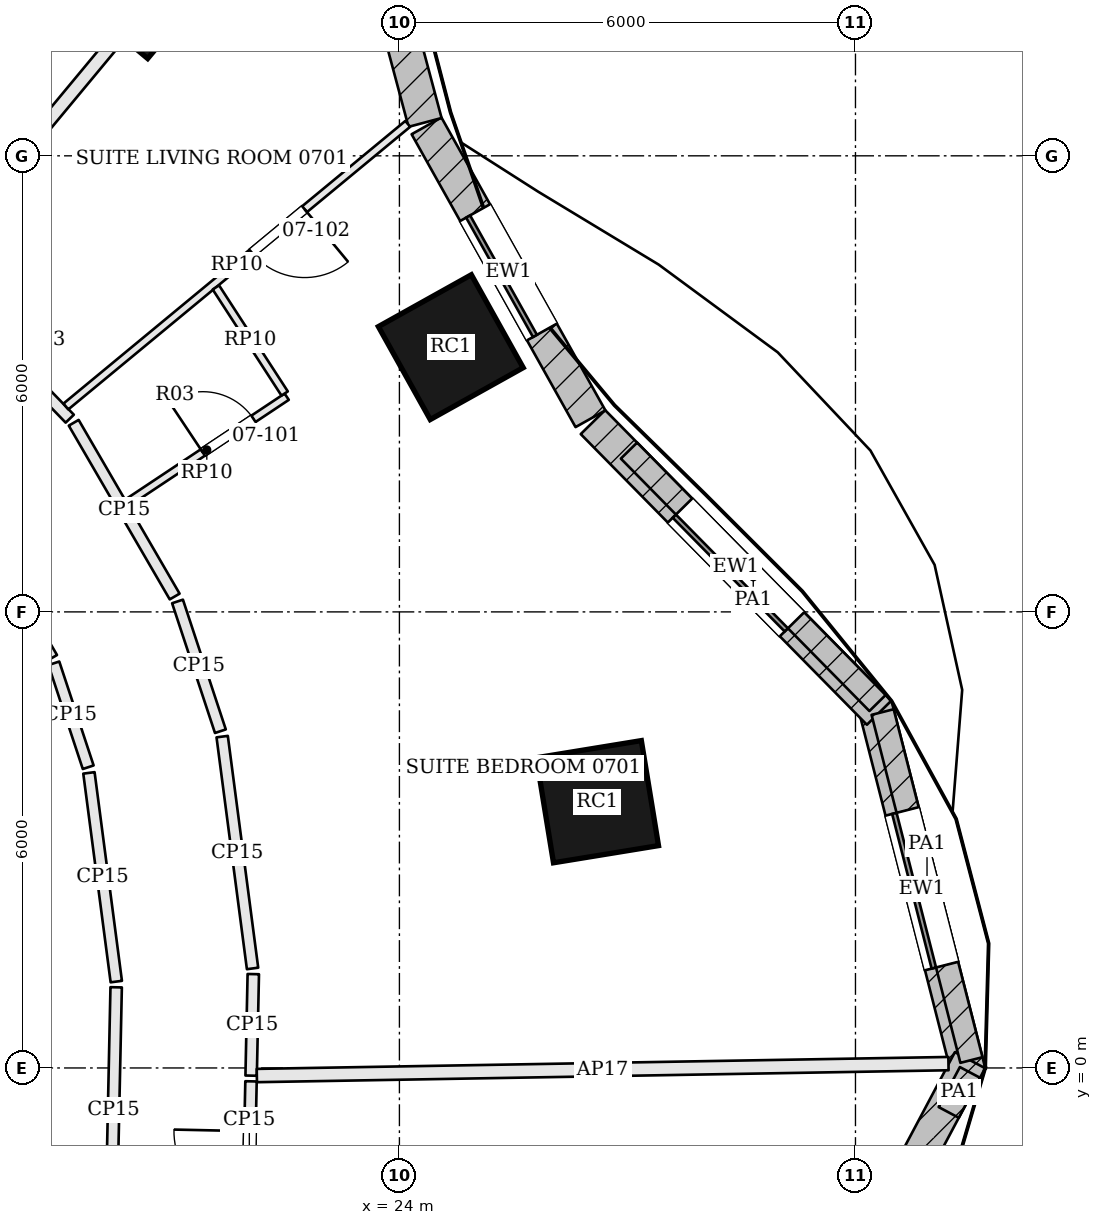
"""IFC4 building model, lengths in metres.
Left out: names, types, materials, properties, quantities, classifications, styles, units other than length and angle.
Written with IfcOpenShell. Run it as: python <this file> out.ifc"""

import sys

from ifc_helpers import new_model, si_unit, direction, frame, frame_2d, origin, origin_2d, place, context, subcontext, project, spatial, rectangle, extrude, element, fill, save


model = new_model("IFC4")
c1 = context("Model", 3, precision=1e-05, world=origin(), true_north=direction((0.0, 1.0)))
c2 = subcontext(c1, "Body", "Model", "MODEL_VIEW")
j1 = project(units=[si_unit("LENGTHUNIT", "METRE"), si_unit("PLANEANGLEUNIT", "RADIAN")], contexts=[c1])
p1 = place(None, origin())
s1 = spatial("IfcSite", under=j1, at=p1, CompositionType="ELEMENT")
p2 = place(p1, origin())
s2 = spatial("IfcBuilding", under=s1, at=p2, CompositionType="ELEMENT")
p3 = place(p2, frame((0.0, 0.0, 41.1)))
s3 = spatial("IfcBuildingStorey", under=s2, at=p3, CompositionType="ELEMENT", Elevation=41.1)
for number, where, z_axis, x_axis in (
    (1, (26.605, 3.503, 0.0), (0.0, 0.0, 1.0), (-0.161, 0.987, 0.0)),
    (2, (24.676, 9.483, 0.0), (0.0, 0.0, 1.0), (-0.487, 0.873, 0.0)),
    (3, (20.6, 14.266, 0.0), (0.0, 0.0, 1.0), (-0.767, 0.641, 0.0)),
):
    element("IfcColumn", number, at=place(p3, frame(where, z_axis=z_axis, x_axis=x_axis)), inside=s3, PredefinedType="COLUMN", context=c2, shape_type="SweptSolid", body=[
        extrude(rectangle(XDim=1.4, YDim=1.4, at=origin_2d()), origin(), (0.0, 0.0, 1.0), 3.6),
    ])
p4 = place(p3, frame((31.489, -0.056, 0.0), z_axis=(0.0, 0.0, 1.0), x_axis=(-0.247283399528, 0.968943197674, 0.0)))
e4 = element("IfcWall", 4, at=p4, inside=s3, PredefinedType="SOLIDWALL", context=c2, shape_type="SweptSolid", body=[
    extrude(rectangle(XDim=4.982, YDim=0.45, at=frame_2d((2.491, 0.0))), origin(), (0.0, 0.0, 1.0), 3.4),
])
p5 = place(p4, frame((1.441, 0.0, 0.9)))
e5 = element("IfcOpeningElement", 5, at=p5, cuts=e4, PredefinedType="OPENING", context=c2, shape_type="SweptSolid", body=[
    extrude(rectangle(XDim=2.1, YDim=2.0, at=frame_2d((1.05, 1.0))), frame((0.0, 0.235, 0.0), z_axis=(0.0, -1.0, 0.0), x_axis=(1.0, 0.0, 0.0)), (0.0, 0.0, 1.0), 0.47),
])
p6 = place(p3, frame((30.311, 4.673, 0.0), z_axis=(0.0, 0.0, 1.0), x_axis=(-0.701580441607, 0.712590263724, 0.0)))
e6 = element("IfcWall", 6, at=p6, inside=s3, PredefinedType="SOLIDWALL", context=c2, shape_type="SweptSolid", body=[
    extrude(rectangle(XDim=5.366, YDim=0.45, at=frame_2d((2.683, 0.0))), origin(), (0.0, 0.0, 1.0), 3.4),
])
p7 = place(p6, frame((1.633, 0.0, 0.9)))
e7 = element("IfcOpeningElement", 7, at=p7, cuts=e6, PredefinedType="OPENING", context=c2, shape_type="SweptSolid", body=[
    extrude(rectangle(XDim=2.1, YDim=2.0, at=frame_2d((1.05, 1.0))), frame((0.0, 0.235, 0.0), z_axis=(0.0, -1.0, 0.0), x_axis=(1.0, 0.0, 0.0)), (0.0, 0.0, 1.0), 0.47),
])
p8 = place(p3, frame((26.514, 8.541, 0.0), z_axis=(0.0, 0.0, 1.0), x_axis=(-0.488504028898, 0.87256163894, 0.0)))
e8 = element("IfcWall", 8, at=p8, inside=s3, PredefinedType="SOLIDWALL", context=c2, shape_type="SweptSolid", body=[
    extrude(rectangle(XDim=4.416, YDim=0.45, at=frame_2d((2.208, 0.0))), origin(), (0.0, 0.0, 1.0), 3.4),
])
p9 = place(p8, frame((1.308, 0.0, 0.9)))
e9 = element("IfcOpeningElement", 9, at=p9, cuts=e8, PredefinedType="OPENING", context=c2, shape_type="SweptSolid", body=[
    extrude(rectangle(XDim=1.8, YDim=2.0, at=frame_2d((0.9, 1.0))), frame((0.0, 0.235, 0.0), z_axis=(0.0, -1.0, 0.0), x_axis=(1.0, 0.0, 0.0)), (0.0, 0.0, 1.0), 0.47),
])
p10 = place(p3, frame((24.337, 12.439, 0.0), z_axis=(0.0, 0.0, 1.0), x_axis=(-0.258441377569, 0.966026942875, 0.0)))
e10 = element("IfcWall", 10, at=p10, inside=s3, PredefinedType="SOLIDWALL", context=c2, shape_type="SweptSolid", body=[
    extrude(rectangle(XDim=4.624, YDim=0.45, at=frame_2d((2.312, 0.0))), origin(), (0.0, 0.0, 1.0), 3.4),
])
p11 = place(p10, frame((1.262, 0.0, 0.9)))
e11 = element("IfcOpeningElement", 11, at=p11, cuts=e10, PredefinedType="OPENING", context=c2, shape_type="SweptSolid", body=[
    extrude(rectangle(XDim=2.1, YDim=2.0, at=frame_2d((1.05, 1.0))), frame((0.0, 0.235, 0.0), z_axis=(0.0, -1.0, 0.0), x_axis=(1.0, 0.0, 0.0)), (0.0, 0.0, 1.0), 0.47),
])
p12 = place(p3, frame((29.065, -4.495, 0.0), z_axis=(0.0, 0.0, 1.0), x_axis=(0.469010051546, 0.883192828067, 0.0)))
e12 = element("IfcWall", 12, at=p12, inside=s3, PredefinedType="SOLIDWALL", context=c2, shape_type="SweptSolid", body=[
    extrude(rectangle(XDim=5.206, YDim=0.45, at=frame_2d((2.603, 0.0))), origin(), (0.0, 0.0, 1.0), 3.4),
])
p13 = place(p12, frame((1.553, 0.0, 0.9)))
e13 = element("IfcOpeningElement", 13, at=p13, cuts=e12, PredefinedType="OPENING", context=c2, shape_type="SweptSolid", body=[
    extrude(rectangle(XDim=2.1, YDim=2.0, at=frame_2d((1.05, 1.0))), frame((0.0, 0.235, 0.0), z_axis=(0.0, -1.0, 0.0), x_axis=(1.0, 0.0, 0.0)), (0.0, 0.0, 1.0), 0.47),
])
p14 = place(p3, frame((31.526, 0.104, 3.6), z_axis=(0.0, 0.0, 1.0), x_axis=(-0.247310993439, 0.96893615503, 0.0)))
e14 = element("IfcWall", 14, at=p14, inside=s3, PredefinedType="PARAPET", context=c2, shape_type="SweptSolid", body=[
    extrude(rectangle(XDim=4.725, YDim=0.3, at=frame_2d((2.362, 0.0))), origin(), (0.0, 0.0, 1.0), 1.1),
])
p15 = place(p3, frame((30.29, 4.801, 3.6), z_axis=(0.0, 0.0, 1.0), x_axis=(-0.701637806996, 0.712533780107, 0.0)))
e15 = element("IfcWall", 15, at=p15, inside=s3, PredefinedType="PARAPET", context=c2, shape_type="SweptSolid", body=[
    extrude(rectangle(XDim=4.661, YDim=0.3, at=frame_2d((2.33, 0.0))), origin(), (0.0, 0.0, 1.0), 1.1),
])
p16 = place(p3, frame((31.227, -0.585, 3.6), z_axis=(0.0, 0.0, 1.0), x_axis=(0.469205161074, 0.883089189619, 0.0)))
e16 = element("IfcWall", 16, at=p16, inside=s3, PredefinedType="PARAPET", context=c2, shape_type="SweptSolid", body=[
    extrude(rectangle(XDim=0.596, YDim=0.3, at=frame_2d((0.298, 0.0))), origin(), (0.0, 0.0, 1.0), 1.1),
])
p17 = place(p3, frame((22.049, -0.101, 0.0), z_axis=(0.0, 0.0, 1.0), x_axis=(0.021197940891, 0.999775298406, 0.0)))
e17 = element("IfcWall", 17, at=p17, inside=s3, PredefinedType="PARTITIONING", context=c2, shape_type="SweptSolid", body=[
    extrude(rectangle(XDim=1.336, YDim=0.15, at=frame_2d((0.668, 0.0))), origin(), (0.0, 0.0, 1.0), 2.68),
])
p18 = place(p3, frame((22.068, 1.309, 0.0), z_axis=(0.0, 0.0, 1.0), x_axis=(-0.129922755307, 0.991524118543, 0.0)))
e18 = element("IfcWall", 18, at=p18, inside=s3, PredefinedType="PARTITIONING", context=c2, shape_type="SweptSolid", body=[
    extrude(rectangle(XDim=3.076, YDim=0.15, at=frame_2d((1.538, 0.0))), origin(), (0.0, 0.0, 1.0), 2.68),
])
p19 = place(p3, frame((21.645, 4.43, 0.0), z_axis=(0.0, 0.0, 1.0), x_axis=(-0.313700743044, 0.949521902756, 0.0)))
e19 = element("IfcWall", 19, at=p19, inside=s3, PredefinedType="PARTITIONING", context=c2, shape_type="SweptSolid", body=[
    extrude(rectangle(XDim=1.798, YDim=0.15, at=frame_2d((0.899, 0.0))), origin(), (0.0, 0.0, 1.0), 2.68),
])
p20 = place(p3, frame((21.043, 6.202, 0.0), z_axis=(0.0, 0.0, 1.0), x_axis=(-0.502371650135, 0.864651794158, 0.0)))
e20 = element("IfcWall", 20, at=p20, inside=s3, PredefinedType="PARTITIONING", context=c2, shape_type="SweptSolid", body=[
    extrude(rectangle(XDim=2.644, YDim=0.15, at=frame_2d((1.322, 0.0))), origin(), (0.0, 0.0, 1.0), 2.68),
])
p21 = place(p3, frame((19.663, 8.542, 0.0), z_axis=(0.0, 0.0, 1.0), x_axis=(-0.695220577526, 0.718796458383, 0.0)))
e21 = element("IfcWall", 21, at=p21, inside=s3, PredefinedType="PARTITIONING", context=c2, shape_type="SweptSolid", body=[
    extrude(rectangle(XDim=2.734, YDim=0.15, at=frame_2d((1.367, 0.0))), origin(), (0.0, 0.0, 1.0), 2.68),
])
p22 = place(p21, frame((0.945, 0.0, 0.0)))
e22 = element("IfcOpeningElement", 22, at=p22, cuts=e21, PredefinedType="OPENING", context=c2, shape_type="SweptSolid", body=[
    extrude(rectangle(XDim=1.0, YDim=2.1, at=frame_2d((0.5, 1.05))), frame((0.0, 0.085, 0.0), z_axis=(0.0, -1.0, 0.0), x_axis=(1.0, 0.0, 0.0)), (0.0, 0.0, 1.0), 0.17),
])
p23 = place(p3, frame((31.223, 0.057, 0.0), z_axis=(0.0, 0.0, 1.0), x_axis=(-0.999851671488, -0.017223095602, 0.0)))
e23 = element("IfcWall", 23, at=p23, inside=s3, PredefinedType="PARTITIONING", context=c2, shape_type="SweptSolid", body=[
    extrude(rectangle(XDim=9.101, YDim=0.175, at=frame_2d((4.55, 0.0))), origin(), (0.0, 0.0, 1.0), 2.68),
])
p24 = place(p3, frame((20.307, 13.573, 0.0), z_axis=(0.0, 0.0, 1.0), x_axis=(-0.638751887509, -0.769412780114, 0.0)))
e24 = element("IfcWall", 24, at=p24, inside=s3, PredefinedType="PARTITIONING", context=c2, shape_type="SweptSolid", body=[
    extrude(rectangle(XDim=3.909, YDim=0.175, at=frame_2d((1.955, 0.0))), origin(), (0.0, 0.0, 1.0), 2.68),
])
p25 = place(p3, frame((22.003, -2.281, 0.0), z_axis=(0.0, 0.0, 1.0), x_axis=(0.021099198105, 0.999777387141, 0.0)))
e25 = element("IfcWall", 25, at=p25, inside=s3, PredefinedType="PARTITIONING", context=c2, shape_type="SweptSolid", body=[
    extrude(rectangle(XDim=2.106, YDim=0.15, at=frame_2d((1.053, 0.0))), origin(), (0.0, 0.0, 1.0), 2.68),
])
p26 = place(p25, frame((0.45, 0.0, 0.0)))
e26 = element("IfcOpeningElement", 26, at=p26, cuts=e25, PredefinedType="OPENING", context=c2, shape_type="SweptSolid", body=[
    extrude(rectangle(XDim=1.0, YDim=2.1, at=frame_2d((0.5, 1.05))), frame((0.0, 0.085, 0.0), z_axis=(0.0, -1.0, 0.0), x_axis=(1.0, 0.0, 0.0)), (0.0, 0.0, 1.0), 0.17),
])
p27 = place(p3, frame((18.306, 7.329, 0.0), z_axis=(0.0, 0.0, 1.0), x_axis=(0.502425081691, -0.864620747662, 0.0)))
e27 = element("IfcWall", 27, at=p27, inside=s3, PredefinedType="PARTITIONING", context=c2, shape_type="SweptSolid", body=[
    extrude(rectangle(XDim=2.237, YDim=0.15, at=frame_2d((1.119, 0.0))), origin(), (0.0, 0.0, 1.0), 2.68),
])
p28 = place(p3, frame((19.454, 5.324, 0.0), z_axis=(0.0, 0.0, 1.0), x_axis=(0.313632756375, -0.949544361327, 0.0)))
e28 = element("IfcWall", 28, at=p28, inside=s3, PredefinedType="PARTITIONING", context=c2, shape_type="SweptSolid", body=[
    extrude(rectangle(XDim=1.44, YDim=0.15, at=frame_2d((0.72, 0.0))), origin(), (0.0, 0.0, 1.0), 2.68),
])
p29 = place(p3, frame((19.915, 3.882, 0.0), z_axis=(0.0, 0.0, 1.0), x_axis=(0.129945947446, -0.991521079323, 0.0)))
e29 = element("IfcWall", 29, at=p29, inside=s3, PredefinedType="PARTITIONING", context=c2, shape_type="SweptSolid", body=[
    extrude(rectangle(XDim=2.769, YDim=0.15, at=frame_2d((1.385, 0.0))), origin(), (0.0, 0.0, 1.0), 2.68),
])
p30 = place(p3, frame((20.273, 1.061, 0.0), z_axis=(0.0, 0.0, 1.0), x_axis=(-0.021166906337, -0.99977595594, 0.0)))
e30 = element("IfcWall", 30, at=p30, inside=s3, PredefinedType="PARTITIONING", context=c2, shape_type="SweptSolid", body=[
    extrude(rectangle(XDim=3.218, YDim=0.15, at=frame_2d((1.609, 0.0))), origin(), (0.0, 0.0, 1.0), 2.68),
])
p31 = place(p3, frame((24.11, 12.42, 0.0), z_axis=(0.0, 0.0, 1.0), x_axis=(-0.770718759666, -0.637175480931, 0.0)))
e31 = element("IfcWall", 31, at=p31, inside=s3, PredefinedType="PARTITIONING", context=c2, shape_type="SweptSolid", body=[
    extrude(rectangle(XDim=5.835, YDim=0.1, at=frame_2d((2.918, 0.0))), origin(), (0.0, 0.0, 1.0), 2.68),
])
p32 = place(p31, frame((1.761, 0.0, 0.0)))
e32 = element("IfcOpeningElement", 32, at=p32, cuts=e31, PredefinedType="OPENING", context=c2, shape_type="SweptSolid", body=[
    extrude(rectangle(XDim=0.9, YDim=2.4, at=frame_2d((0.45, 1.2))), frame((0.0, 0.06, 0.0), z_axis=(0.0, -1.0, 0.0), x_axis=(1.0, 0.0, 0.0)), (0.0, 0.0, 1.0), 0.12),
])
p33 = place(p3, frame((20.415, 7.433, 0.0), z_axis=(0.0, 0.0, 1.0), x_axis=(0.832615138826, 0.553851993404, 0.0)))
e33 = element("IfcWall", 33, at=p33, inside=s3, PredefinedType="PARTITIONING", context=c2, shape_type="SweptSolid", body=[
    extrude(rectangle(XDim=2.525, YDim=0.1, at=frame_2d((1.262, 0.0))), origin(), (0.0, 0.0, 1.0), 2.68),
])
p34 = place(p33, frame((1.2, 0.0, 0.0)))
e34 = element("IfcOpeningElement", 34, at=p34, cuts=e33, PredefinedType="OPENING", context=c2, shape_type="SweptSolid", body=[
    extrude(rectangle(XDim=0.8, YDim=2.1, at=frame_2d((0.4, 1.05))), frame((0.0, 0.06, 0.0), z_axis=(0.0, -1.0, 0.0), x_axis=(1.0, 0.0, 0.0)), (0.0, 0.0, 1.0), 0.12),
])
p35 = place(p3, frame((22.49, 8.873, 0.0), z_axis=(0.0, 0.0, 1.0), x_axis=(-0.543847599443, 0.839184001623, 0.0)))
e35 = element("IfcWall", 35, at=p35, inside=s3, PredefinedType="PARTITIONING", context=c2, shape_type="SweptSolid", body=[
    extrude(rectangle(XDim=1.663, YDim=0.1, at=frame_2d((0.832, 0.0))), origin(), (0.0, 0.0, 1.0), 2.68),
])
p36 = place(p3, frame((20.191, 19.988, 0.0), z_axis=(0.0, 0.0, 1.0), x_axis=(-0.505620182585, -0.862756182802, 0.0)))
e36 = element("IfcWall", 36, at=p36, inside=s3, PredefinedType="PARTITIONING", context=c2, shape_type="SweptSolid", body=[
    extrude(rectangle(XDim=9.211, YDim=0.1, at=frame_2d((4.605, 0.0))), origin(), (0.0, 0.0, 1.0), 2.68),
])
p37 = place(p36, frame((5.136, 0.0, 0.0)))
e37 = element("IfcOpeningElement", 37, at=p37, cuts=e36, PredefinedType="OPENING", context=c2, shape_type="SweptSolid", body=[
    extrude(rectangle(XDim=0.9, YDim=2.4, at=frame_2d((0.45, 1.2))), frame((0.0, 0.06, 0.0), z_axis=(0.0, -1.0, 0.0), x_axis=(1.0, 0.0, 0.0)), (0.0, 0.0, 1.0), 0.12),
])
p38 = place(p5, origin())
e38 = element("IfcWindow", 38, at=p38, inside=s3, PartitioningType="SINGLE_PANEL", PredefinedType="WINDOW", context=c2, shape_type="SweptSolid", body=[
    extrude(rectangle(XDim=2.1, YDim=2.0, at=frame_2d((1.05, 1.0))), frame((0.0, 0.135, 0.0), z_axis=(0.0, -1.0, 0.0), x_axis=(1.0, 0.0, 0.0)), (0.0, 0.0, 1.0), 0.06),
])
fill(e5, e38)
p39 = place(p7, origin())
e39 = element("IfcWindow", 39, at=p39, inside=s3, PartitioningType="SINGLE_PANEL", PredefinedType="WINDOW", context=c2, shape_type="SweptSolid", body=[
    extrude(rectangle(XDim=2.1, YDim=2.0, at=frame_2d((1.05, 1.0))), frame((0.0, 0.135, 0.0), z_axis=(0.0, -1.0, 0.0), x_axis=(1.0, 0.0, 0.0)), (0.0, 0.0, 1.0), 0.06),
])
fill(e7, e39)
p40 = place(p9, origin())
e40 = element("IfcWindow", 40, at=p40, inside=s3, PartitioningType="SINGLE_PANEL", PredefinedType="WINDOW", context=c2, shape_type="SweptSolid", body=[
    extrude(rectangle(XDim=1.8, YDim=2.0, at=frame_2d((0.9, 1.0))), frame((0.0, 0.135, 0.0), z_axis=(0.0, -1.0, 0.0), x_axis=(1.0, 0.0, 0.0)), (0.0, 0.0, 1.0), 0.06),
])
fill(e9, e40)
p41 = place(p34, origin())
e41 = element("IfcDoor", 41, at=p41, inside=s3, OperationType="SINGLE_SWING_LEFT", PredefinedType="DOOR", context=c2, shape_type="SweptSolid", body=[
    extrude(rectangle(XDim=0.8, YDim=2.1, at=frame_2d((0.4, 1.05))), frame((0.0, 0.025, 0.0), z_axis=(0.0, -1.0, 0.0), x_axis=(1.0, 0.0, 0.0)), (0.0, 0.0, 1.0), 0.05),
])
fill(e34, e41)
p42 = place(p32, origin())
e42 = element("IfcDoor", 42, at=p42, inside=s3, OperationType="SINGLE_SWING_LEFT", PredefinedType="DOOR", context=c2, shape_type="SweptSolid", body=[
    extrude(rectangle(XDim=0.9, YDim=2.4, at=frame_2d((0.45, 1.2))), frame((0.0, 0.025, 0.0), z_axis=(0.0, -1.0, 0.0), x_axis=(1.0, 0.0, 0.0)), (0.0, 0.0, 1.0), 0.05),
])
fill(e32, e42)
p43 = place(p26, origin())
e43 = element("IfcDoor", 43, at=p43, inside=s3, OperationType="SINGLE_SWING_RIGHT", PredefinedType="DOOR", context=c2, shape_type="SweptSolid", body=[
    extrude(rectangle(XDim=1.0, YDim=2.1, at=frame_2d((0.5, 1.05))), frame((0.0, 0.025, 0.0), z_axis=(0.0, -1.0, 0.0), x_axis=(1.0, 0.0, 0.0)), (0.0, 0.0, 1.0), 0.05),
])
fill(e26, e43)
save(model, sys.argv[1])
